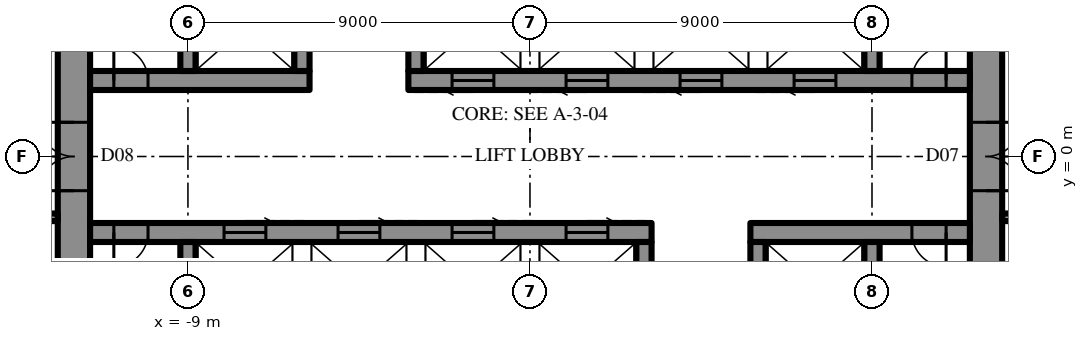
"""IFC4 building model, lengths in metres.
Left out: names, types, materials, properties, quantities, classifications, styles, units other than length and angle.
Written with IfcOpenShell. Run it as: python <this file> out.ifc"""

import sys

from ifc_helpers import new_model, si_unit, direction, frame, frame_2d, origin, place, context, subcontext, project, spatial, rectangle, extrude, element, fill, save


model = new_model("IFC4")
c1 = context("Model", 3, precision=1e-05, world=origin(), true_north=direction((0.0, 1.0)))
c2 = subcontext(c1, "Body", "Model", "MODEL_VIEW")
j1 = project(units=[si_unit("LENGTHUNIT", "METRE"), si_unit("PLANEANGLEUNIT", "RADIAN")], contexts=[c1])
p1 = place(None, origin())
s1 = spatial("IfcSite", under=j1, at=p1, CompositionType="ELEMENT")
p2 = place(p1, origin())
s2 = spatial("IfcBuilding", under=s1, at=p2, CompositionType="ELEMENT")
p3 = place(p2, frame((0.0, 0.0, 332.5)))
s3 = spatial("IfcBuildingStorey", under=s2, at=p3, CompositionType="ELEMENT", Elevation=332.5)
p4 = place(p3, frame((12.0, -10.7, 0.0), z_axis=(0.0, 0.0, 1.0), x_axis=(0.0, 1.0, 0.0)))
e1 = element("IfcWall", 1, at=p4, inside=s3, PredefinedType="SHEAR", context=c2, shape_type="SweptSolid", body=[
    extrude(rectangle(XDim=21.4, YDim=0.85, at=frame_2d((10.7, 0.0))), origin(), (0.0, 0.0, 1.0), 4.2),
])
p5 = place(p4, frame((9.8, 0.0, 0.0)))
e2 = element("IfcOpeningElement", 2, at=p5, cuts=e1, PredefinedType="OPENING", context=c2, shape_type="SweptSolid", body=[
    extrude(rectangle(XDim=1.8, YDim=2.4, at=frame_2d((0.9, 1.2))), frame((0.0, 0.435, 0.0), z_axis=(0.0, -1.0, 0.0), x_axis=(1.0, 0.0, 0.0)), (0.0, 0.0, 1.0), 0.87),
])
p6 = place(p3, frame((-12.0, 10.7, 0.0), z_axis=(0.0, 0.0, 1.0), x_axis=(0.0, -1.0, 0.0)))
e3 = element("IfcWall", 3, at=p6, inside=s3, PredefinedType="SHEAR", context=c2, shape_type="SweptSolid", body=[
    extrude(rectangle(XDim=21.4, YDim=0.85, at=frame_2d((10.7, 0.0))), origin(), (0.0, 0.0, 1.0), 4.2),
])
p7 = place(p6, frame((9.8, 0.0, 0.0)))
e4 = element("IfcOpeningElement", 4, at=p7, cuts=e3, PredefinedType="OPENING", context=c2, shape_type="SweptSolid", body=[
    extrude(rectangle(XDim=1.8, YDim=2.4, at=frame_2d((0.9, 1.2))), frame((0.0, 0.435, 0.0), z_axis=(0.0, -1.0, 0.0), x_axis=(1.0, 0.0, 0.0)), (0.0, 0.0, 1.0), 0.87),
])
p8 = place(p3, frame((-11.575, 2.0, 0.0), z_axis=(0.0, 0.0, 1.0), x_axis=(1.0, 0.0, 0.0)))
e5 = element("IfcWall", 5, at=p8, inside=s3, PredefinedType="SHEAR", context=c2, shape_type="SweptSolid", body=[
    extrude(rectangle(XDim=5.775, YDim=0.5, at=frame_2d((2.887, 0.0))), origin(), (0.0, 0.0, 1.0), 4.2),
])
p9 = place(p8, frame((0.625, 0.0, 0.0)))
e6 = element("IfcOpeningElement", 6, at=p9, cuts=e5, PredefinedType="OPENING", context=c2, shape_type="SweptSolid", body=[
    extrude(rectangle(XDim=0.9, YDim=2.2, at=frame_2d((0.45, 1.1))), frame((0.0, 0.26, 0.0), z_axis=(0.0, -1.0, 0.0), x_axis=(1.0, 0.0, 0.0)), (0.0, 0.0, 1.0), 0.52),
])
p10 = place(p3, frame((-3.2, 2.0, 0.0), z_axis=(0.0, 0.0, 1.0), x_axis=(1.0, 0.0, 0.0)))
e7 = element("IfcWall", 7, at=p10, inside=s3, PredefinedType="SHEAR", context=c2, shape_type="SweptSolid", body=[
    extrude(rectangle(XDim=14.775, YDim=0.5, at=frame_2d((7.387, 0.0))), origin(), (0.0, 0.0, 1.0), 4.2),
])
p11 = place(p10, frame((13.25, 0.0, 0.0)))
e8 = element("IfcOpeningElement", 8, at=p11, cuts=e7, PredefinedType="OPENING", context=c2, shape_type="SweptSolid", body=[
    extrude(rectangle(XDim=0.9, YDim=2.2, at=frame_2d((0.45, 1.1))), frame((0.0, 0.26, 0.0), z_axis=(0.0, -1.0, 0.0), x_axis=(1.0, 0.0, 0.0)), (0.0, 0.0, 1.0), 0.52),
])
p12 = place(p10, frame((1.15, 0.0, 0.0)))
e9 = element("IfcOpeningElement", 9, at=p12, cuts=e7, PredefinedType="OPENING", context=c2, shape_type="SweptSolid", body=[
    extrude(rectangle(XDim=1.1, YDim=2.2, at=frame_2d((0.55, 1.1))), frame((0.0, 0.26, 0.0), z_axis=(0.0, -1.0, 0.0), x_axis=(1.0, 0.0, 0.0)), (0.0, 0.0, 1.0), 0.52),
])
p13 = place(p10, frame((4.15, 0.0, 0.0)))
e10 = element("IfcOpeningElement", 10, at=p13, cuts=e7, PredefinedType="OPENING", context=c2, shape_type="SweptSolid", body=[
    extrude(rectangle(XDim=1.1, YDim=2.2, at=frame_2d((0.55, 1.1))), frame((0.0, 0.26, 0.0), z_axis=(0.0, -1.0, 0.0), x_axis=(1.0, 0.0, 0.0)), (0.0, 0.0, 1.0), 0.52),
])
p14 = place(p10, frame((7.15, 0.0, 0.0)))
e11 = element("IfcOpeningElement", 11, at=p14, cuts=e7, PredefinedType="OPENING", context=c2, shape_type="SweptSolid", body=[
    extrude(rectangle(XDim=1.1, YDim=2.2, at=frame_2d((0.55, 1.1))), frame((0.0, 0.26, 0.0), z_axis=(0.0, -1.0, 0.0), x_axis=(1.0, 0.0, 0.0)), (0.0, 0.0, 1.0), 0.52),
])
p15 = place(p10, frame((10.15, 0.0, 0.0)))
e12 = element("IfcOpeningElement", 12, at=p15, cuts=e7, PredefinedType="OPENING", context=c2, shape_type="SweptSolid", body=[
    extrude(rectangle(XDim=1.1, YDim=2.2, at=frame_2d((0.55, 1.1))), frame((0.0, 0.26, 0.0), z_axis=(0.0, -1.0, 0.0), x_axis=(1.0, 0.0, 0.0)), (0.0, 0.0, 1.0), 0.52),
])
for number, where, z_axis, x_axis in (
    (13, (-9.0, 2.25, 0.0), (0.0, 0.0, 1.0), (0.0, 1.0, 0.0)),
    (14, (-6.0, 2.25, 0.0), (0.0, 0.0, 1.0), (0.0, 1.0, 0.0)),
    (15, (-3.0, 2.25, 0.0), (0.0, 0.0, 1.0), (0.0, 1.0, 0.0)),
    (16, (9.0, 2.25, 0.0), (0.0, 0.0, 1.0), (0.0, 1.0, 0.0)),
):
    element("IfcWall", number, at=place(p3, frame(where, z_axis=z_axis, x_axis=x_axis)), inside=s3, PredefinedType="SHEAR", context=c2, shape_type="SweptSolid", body=[
        extrude(rectangle(XDim=2.3, YDim=0.4, at=frame_2d((1.15, 0.0))), origin(), (0.0, 0.0, 1.0), 4.2),
    ])
p16 = place(p3, frame((11.575, -2.0, 0.0), z_axis=(0.0, 0.0, 1.0), x_axis=(-1.0, 0.0, 0.0)))
e17 = element("IfcWall", 17, at=p16, inside=s3, PredefinedType="SHEAR", context=c2, shape_type="SweptSolid", body=[
    extrude(rectangle(XDim=5.775, YDim=0.5, at=frame_2d((2.887, 0.0))), origin(), (0.0, 0.0, 1.0), 4.2),
])
p17 = place(p16, frame((0.625, 0.0, 0.0)))
e18 = element("IfcOpeningElement", 18, at=p17, cuts=e17, PredefinedType="OPENING", context=c2, shape_type="SweptSolid", body=[
    extrude(rectangle(XDim=0.9, YDim=2.2, at=frame_2d((0.45, 1.1))), frame((0.0, 0.26, 0.0), z_axis=(0.0, -1.0, 0.0), x_axis=(1.0, 0.0, 0.0)), (0.0, 0.0, 1.0), 0.52),
])
p18 = place(p3, frame((3.2, -2.0, 0.0), z_axis=(0.0, 0.0, 1.0), x_axis=(-1.0, 0.0, 0.0)))
e19 = element("IfcWall", 19, at=p18, inside=s3, PredefinedType="SHEAR", context=c2, shape_type="SweptSolid", body=[
    extrude(rectangle(XDim=14.775, YDim=0.5, at=frame_2d((7.387, 0.0))), origin(), (0.0, 0.0, 1.0), 4.2),
])
p19 = place(p18, frame((13.25, 0.0, 0.0)))
e20 = element("IfcOpeningElement", 20, at=p19, cuts=e19, PredefinedType="OPENING", context=c2, shape_type="SweptSolid", body=[
    extrude(rectangle(XDim=0.9, YDim=2.2, at=frame_2d((0.45, 1.1))), frame((0.0, 0.26, 0.0), z_axis=(0.0, -1.0, 0.0), x_axis=(1.0, 0.0, 0.0)), (0.0, 0.0, 1.0), 0.52),
])
p20 = place(p18, frame((1.15, 0.0, 0.0)))
e21 = element("IfcOpeningElement", 21, at=p20, cuts=e19, PredefinedType="OPENING", context=c2, shape_type="SweptSolid", body=[
    extrude(rectangle(XDim=1.1, YDim=2.2, at=frame_2d((0.55, 1.1))), frame((0.0, 0.26, 0.0), z_axis=(0.0, -1.0, 0.0), x_axis=(1.0, 0.0, 0.0)), (0.0, 0.0, 1.0), 0.52),
])
p21 = place(p18, frame((4.15, 0.0, 0.0)))
e22 = element("IfcOpeningElement", 22, at=p21, cuts=e19, PredefinedType="OPENING", context=c2, shape_type="SweptSolid", body=[
    extrude(rectangle(XDim=1.1, YDim=2.2, at=frame_2d((0.55, 1.1))), frame((0.0, 0.26, 0.0), z_axis=(0.0, -1.0, 0.0), x_axis=(1.0, 0.0, 0.0)), (0.0, 0.0, 1.0), 0.52),
])
p22 = place(p18, frame((7.15, 0.0, 0.0)))
e23 = element("IfcOpeningElement", 23, at=p22, cuts=e19, PredefinedType="OPENING", context=c2, shape_type="SweptSolid", body=[
    extrude(rectangle(XDim=1.1, YDim=2.2, at=frame_2d((0.55, 1.1))), frame((0.0, 0.26, 0.0), z_axis=(0.0, -1.0, 0.0), x_axis=(1.0, 0.0, 0.0)), (0.0, 0.0, 1.0), 0.52),
])
p23 = place(p18, frame((10.15, 0.0, 0.0)))
e24 = element("IfcOpeningElement", 24, at=p23, cuts=e19, PredefinedType="OPENING", context=c2, shape_type="SweptSolid", body=[
    extrude(rectangle(XDim=1.1, YDim=2.2, at=frame_2d((0.55, 1.1))), frame((0.0, 0.26, 0.0), z_axis=(0.0, -1.0, 0.0), x_axis=(1.0, 0.0, 0.0)), (0.0, 0.0, 1.0), 0.52),
])
for number, where, z_axis, x_axis in (
    (25, (9.0, -2.25, 0.0), (0.0, 0.0, 1.0), (0.0, -1.0, 0.0)),
    (26, (6.0, -2.25, 0.0), (0.0, 0.0, 1.0), (0.0, -1.0, 0.0)),
    (27, (3.0, -2.25, 0.0), (0.0, 0.0, 1.0), (0.0, -1.0, 0.0)),
    (28, (-9.0, -2.25, 0.0), (0.0, 0.0, 1.0), (0.0, -1.0, 0.0)),
):
    element("IfcWall", number, at=place(p3, frame(where, z_axis=z_axis, x_axis=x_axis)), inside=s3, PredefinedType="SHEAR", context=c2, shape_type="SweptSolid", body=[
        extrude(rectangle(XDim=2.3, YDim=0.4, at=frame_2d((1.15, 0.0))), origin(), (0.0, 0.0, 1.0), 4.2),
    ])
p24 = place(p3, frame((12.425, -1.6, 0.0), z_axis=(0.0, 0.0, 1.0), x_axis=(1.0, 0.0, 0.0)))
e29 = element("IfcWall", 29, at=p24, inside=s3, PredefinedType="PARTITIONING", context=c2, shape_type="SweptSolid", body=[
    extrude(rectangle(XDim=16.5, YDim=0.2, at=frame_2d((8.25, 0.0))), origin(), (0.0, 0.0, 1.0), 4.0),
])
p25 = place(p24, frame((1.15, 0.0, 0.0)))
e30 = element("IfcOpeningElement", 30, at=p25, cuts=e29, PredefinedType="OPENING", context=c2, shape_type="SweptSolid", body=[
    extrude(rectangle(XDim=1.0, YDim=2.2, at=frame_2d((0.5, 1.1))), frame((0.0, 0.11, 0.0), z_axis=(0.0, -1.0, 0.0), x_axis=(1.0, 0.0, 0.0)), (0.0, 0.0, 1.0), 0.22),
])
p26 = place(p3, frame((-12.425, -1.6, 0.0), z_axis=(0.0, 0.0, 1.0), x_axis=(-1.0, 0.0, 0.0)))
e31 = element("IfcWall", 31, at=p26, inside=s3, PredefinedType="PARTITIONING", context=c2, shape_type="SweptSolid", body=[
    extrude(rectangle(XDim=16.5, YDim=0.2, at=frame_2d((8.25, 0.0))), origin(), (0.0, 0.0, 1.0), 4.0),
])
p27 = place(p26, frame((1.15, 0.0, 0.0)))
e32 = element("IfcOpeningElement", 32, at=p27, cuts=e31, PredefinedType="OPENING", context=c2, shape_type="SweptSolid", body=[
    extrude(rectangle(XDim=1.0, YDim=2.2, at=frame_2d((0.5, 1.1))), frame((0.0, 0.11, 0.0), z_axis=(0.0, -1.0, 0.0), x_axis=(1.0, 0.0, 0.0)), (0.0, 0.0, 1.0), 0.22),
])
p28 = place(p5, frame((1.8, 0.0, 0.0), z_axis=(0.0, 0.0, 1.0), x_axis=(-1.0, 0.0, 0.0)))
e33 = element("IfcDoor", 33, at=p28, inside=s3, OperationType="DOUBLE_DOOR_SINGLE_SWING", PredefinedType="DOOR", context=c2, shape_type="SweptSolid", body=[
    extrude(rectangle(XDim=1.8, YDim=2.4, at=frame_2d((0.9, 1.2))), frame((0.0, 0.025, 0.0), z_axis=(0.0, -1.0, 0.0), x_axis=(1.0, 0.0, 0.0)), (0.0, 0.0, 1.0), 0.05),
])
fill(e2, e33)
p29 = place(p7, frame((1.8, 0.0, 0.0), z_axis=(0.0, 0.0, 1.0), x_axis=(-1.0, 0.0, 0.0)))
e34 = element("IfcDoor", 34, at=p29, inside=s3, OperationType="DOUBLE_DOOR_SINGLE_SWING", PredefinedType="DOOR", context=c2, shape_type="SweptSolid", body=[
    extrude(rectangle(XDim=1.8, YDim=2.4, at=frame_2d((0.9, 1.2))), frame((0.0, 0.025, 0.0), z_axis=(0.0, -1.0, 0.0), x_axis=(1.0, 0.0, 0.0)), (0.0, 0.0, 1.0), 0.05),
])
fill(e4, e34)
p30 = place(p9, origin())
e35 = element("IfcDoor", 35, at=p30, inside=s3, OperationType="SINGLE_SWING_RIGHT", PredefinedType="DOOR", context=c2, shape_type="SweptSolid", body=[
    extrude(rectangle(XDim=0.9, YDim=2.2, at=frame_2d((0.45, 1.1))), frame((0.0, 0.025, 0.0), z_axis=(0.0, -1.0, 0.0), x_axis=(1.0, 0.0, 0.0)), (0.0, 0.0, 1.0), 0.05),
])
fill(e6, e35)
p31 = place(p11, origin())
e36 = element("IfcDoor", 36, at=p31, inside=s3, OperationType="SINGLE_SWING_LEFT", PredefinedType="DOOR", context=c2, shape_type="SweptSolid", body=[
    extrude(rectangle(XDim=0.9, YDim=2.2, at=frame_2d((0.45, 1.1))), frame((0.0, 0.025, 0.0), z_axis=(0.0, -1.0, 0.0), x_axis=(1.0, 0.0, 0.0)), (0.0, 0.0, 1.0), 0.05),
])
fill(e8, e36)
p32 = place(p17, origin())
e37 = element("IfcDoor", 37, at=p32, inside=s3, OperationType="SINGLE_SWING_RIGHT", PredefinedType="DOOR", context=c2, shape_type="SweptSolid", body=[
    extrude(rectangle(XDim=0.9, YDim=2.2, at=frame_2d((0.45, 1.1))), frame((0.0, 0.025, 0.0), z_axis=(0.0, -1.0, 0.0), x_axis=(1.0, 0.0, 0.0)), (0.0, 0.0, 1.0), 0.05),
])
fill(e18, e37)
p33 = place(p19, origin())
e38 = element("IfcDoor", 38, at=p33, inside=s3, OperationType="SINGLE_SWING_LEFT", PredefinedType="DOOR", context=c2, shape_type="SweptSolid", body=[
    extrude(rectangle(XDim=0.9, YDim=2.2, at=frame_2d((0.45, 1.1))), frame((0.0, 0.025, 0.0), z_axis=(0.0, -1.0, 0.0), x_axis=(1.0, 0.0, 0.0)), (0.0, 0.0, 1.0), 0.05),
])
fill(e20, e38)
p34 = place(p12, frame((1.1, 0.0, 0.0), z_axis=(0.0, 0.0, 1.0), x_axis=(-1.0, 0.0, 0.0)))
e39 = element("IfcDoor", 39, at=p34, inside=s3, OperationType="SLIDING_TO_LEFT", PredefinedType="DOOR", context=c2, shape_type="SweptSolid", body=[
    extrude(rectangle(XDim=1.1, YDim=2.2, at=frame_2d((0.55, 1.1))), frame((0.0, 0.025, 0.0), z_axis=(0.0, -1.0, 0.0), x_axis=(1.0, 0.0, 0.0)), (0.0, 0.0, 1.0), 0.05),
])
fill(e9, e39)
p35 = place(p13, frame((1.1, 0.0, 0.0), z_axis=(0.0, 0.0, 1.0), x_axis=(-1.0, 0.0, 0.0)))
e40 = element("IfcDoor", 40, at=p35, inside=s3, OperationType="SLIDING_TO_LEFT", PredefinedType="DOOR", context=c2, shape_type="SweptSolid", body=[
    extrude(rectangle(XDim=1.1, YDim=2.2, at=frame_2d((0.55, 1.1))), frame((0.0, 0.025, 0.0), z_axis=(0.0, -1.0, 0.0), x_axis=(1.0, 0.0, 0.0)), (0.0, 0.0, 1.0), 0.05),
])
fill(e10, e40)
p36 = place(p14, frame((1.1, 0.0, 0.0), z_axis=(0.0, 0.0, 1.0), x_axis=(-1.0, 0.0, 0.0)))
e41 = element("IfcDoor", 41, at=p36, inside=s3, OperationType="SLIDING_TO_LEFT", PredefinedType="DOOR", context=c2, shape_type="SweptSolid", body=[
    extrude(rectangle(XDim=1.1, YDim=2.2, at=frame_2d((0.55, 1.1))), frame((0.0, 0.025, 0.0), z_axis=(0.0, -1.0, 0.0), x_axis=(1.0, 0.0, 0.0)), (0.0, 0.0, 1.0), 0.05),
])
fill(e11, e41)
p37 = place(p15, frame((1.1, 0.0, 0.0), z_axis=(0.0, 0.0, 1.0), x_axis=(-1.0, 0.0, 0.0)))
e42 = element("IfcDoor", 42, at=p37, inside=s3, OperationType="SLIDING_TO_LEFT", PredefinedType="DOOR", context=c2, shape_type="SweptSolid", body=[
    extrude(rectangle(XDim=1.1, YDim=2.2, at=frame_2d((0.55, 1.1))), frame((0.0, 0.025, 0.0), z_axis=(0.0, -1.0, 0.0), x_axis=(1.0, 0.0, 0.0)), (0.0, 0.0, 1.0), 0.05),
])
fill(e12, e42)
p38 = place(p20, frame((1.1, 0.0, 0.0), z_axis=(0.0, 0.0, 1.0), x_axis=(-1.0, 0.0, 0.0)))
e43 = element("IfcDoor", 43, at=p38, inside=s3, OperationType="SLIDING_TO_LEFT", PredefinedType="DOOR", context=c2, shape_type="SweptSolid", body=[
    extrude(rectangle(XDim=1.1, YDim=2.2, at=frame_2d((0.55, 1.1))), frame((0.0, 0.025, 0.0), z_axis=(0.0, -1.0, 0.0), x_axis=(1.0, 0.0, 0.0)), (0.0, 0.0, 1.0), 0.05),
])
fill(e21, e43)
p39 = place(p21, frame((1.1, 0.0, 0.0), z_axis=(0.0, 0.0, 1.0), x_axis=(-1.0, 0.0, 0.0)))
e44 = element("IfcDoor", 44, at=p39, inside=s3, OperationType="SLIDING_TO_LEFT", PredefinedType="DOOR", context=c2, shape_type="SweptSolid", body=[
    extrude(rectangle(XDim=1.1, YDim=2.2, at=frame_2d((0.55, 1.1))), frame((0.0, 0.025, 0.0), z_axis=(0.0, -1.0, 0.0), x_axis=(1.0, 0.0, 0.0)), (0.0, 0.0, 1.0), 0.05),
])
fill(e22, e44)
p40 = place(p22, frame((1.1, 0.0, 0.0), z_axis=(0.0, 0.0, 1.0), x_axis=(-1.0, 0.0, 0.0)))
e45 = element("IfcDoor", 45, at=p40, inside=s3, OperationType="SLIDING_TO_LEFT", PredefinedType="DOOR", context=c2, shape_type="SweptSolid", body=[
    extrude(rectangle(XDim=1.1, YDim=2.2, at=frame_2d((0.55, 1.1))), frame((0.0, 0.025, 0.0), z_axis=(0.0, -1.0, 0.0), x_axis=(1.0, 0.0, 0.0)), (0.0, 0.0, 1.0), 0.05),
])
fill(e23, e45)
p41 = place(p23, frame((1.1, 0.0, 0.0), z_axis=(0.0, 0.0, 1.0), x_axis=(-1.0, 0.0, 0.0)))
e46 = element("IfcDoor", 46, at=p41, inside=s3, OperationType="SLIDING_TO_LEFT", PredefinedType="DOOR", context=c2, shape_type="SweptSolid", body=[
    extrude(rectangle(XDim=1.1, YDim=2.2, at=frame_2d((0.55, 1.1))), frame((0.0, 0.025, 0.0), z_axis=(0.0, -1.0, 0.0), x_axis=(1.0, 0.0, 0.0)), (0.0, 0.0, 1.0), 0.05),
])
fill(e24, e46)
save(model, sys.argv[1])
